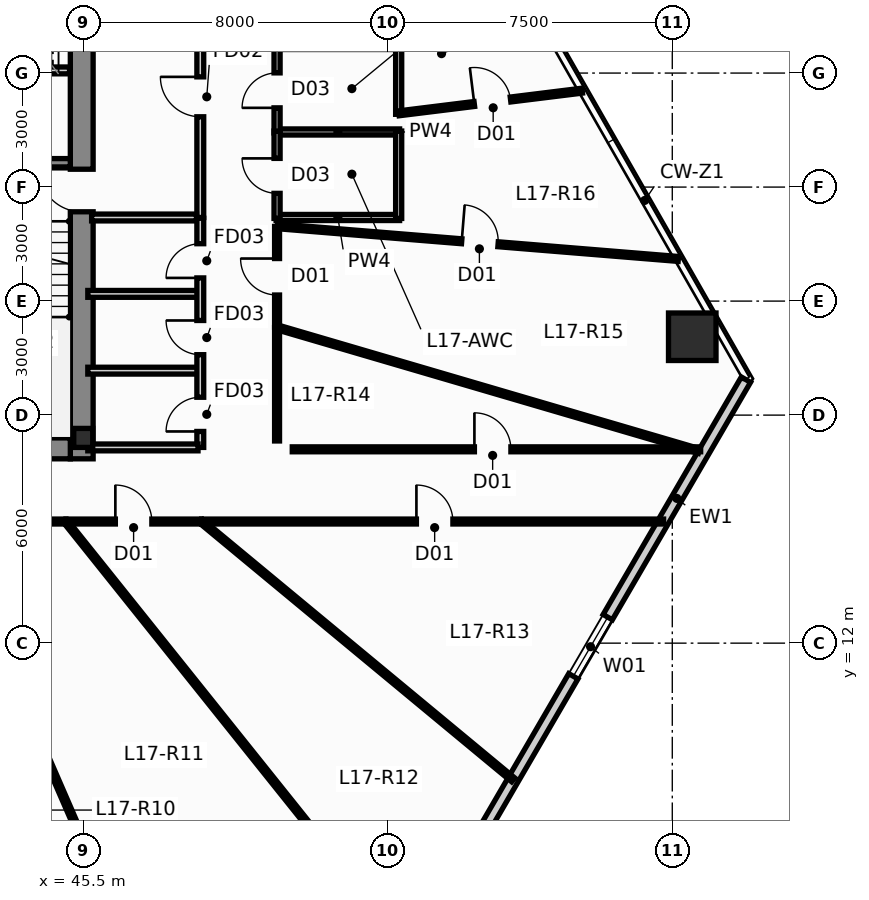
"""IFC4 building model, lengths in metres.
Left out: names, types, materials, properties, quantities, classifications, styles, units other than length and angle.
Written with IfcOpenShell. Run it as: python <this file> out.ifc"""

import sys

from ifc_helpers import new_model, si_unit, direction, frame, frame_2d, origin, origin_2d, place, context, subcontext, project, spatial, rectangle, hollow_rectangle, i_section, extrude, source, transform, mapped, element, fill, save


model = new_model("IFC4")
c1 = context("Model", 3, precision=1e-05, world=origin(), true_north=direction((0.0, 1.0)))
c2 = subcontext(c1, "Body", "Model", "MODEL_VIEW")
j1 = project(units=[si_unit("LENGTHUNIT", "METRE"), si_unit("PLANEANGLEUNIT", "RADIAN")], contexts=[c1])
p1 = place(None, origin())
s1 = spatial("IfcSite", under=j1, at=p1, CompositionType="ELEMENT")
p2 = place(p1, origin())
s2 = spatial("IfcBuilding", under=s1, at=p2, CompositionType="ELEMENT")
p3 = place(p2, frame((0.0, 0.0, 67.75)))
s3 = spatial("IfcBuildingStorey", under=s2, at=p3, CompositionType="ELEMENT", Elevation=67.75)
m1 = source(origin(), c2, "Body", "SweptSolid", [
    extrude(i_section(OverallWidth=0.5, OverallDepth=0.5, WebThickness=0.028, FlangeThickness=0.04, at=origin_2d()), origin(), (0.0, 0.0, 1.0), 3.65),
])
p4 = place(p3, frame((45.5, 17.4, 0.0), z_axis=(0.0, 0.0, 1.0), x_axis=(1.0, 0.0, 0.0)))
e1 = element("IfcColumn", 1, at=p4, inside=s3, PredefinedType="COLUMN", context=c2, shape_type="MappedRepresentation", body=[
    mapped(m1, transform((0.0, 0.0, 0.0), scale=1.0)),
])
p5 = place(p3, frame((45.46, 16.85, 0.0), z_axis=(0.0, 0.0, 1.0), x_axis=(0.0, 1.0, 0.0)))
e2 = element("IfcWall", 2, at=p5, inside=s3, PredefinedType="SHEAR", context=c2, shape_type="SweptSolid", body=[
    extrude(rectangle(XDim=13.425, YDim=0.6, at=frame_2d((6.712, 0.0))), origin(), (0.0, 0.0, 1.0), 3.65),
])
p6 = place(p5, frame((6.5, 0.0, 0.0)))
e3 = element("IfcOpeningElement", 3, at=p6, cuts=e2, PredefinedType="OPENING", context=c2, shape_type="SweptSolid", body=[
    extrude(rectangle(XDim=1.12, YDim=2.15, at=frame_2d((0.56, 1.075))), frame((0.0, 0.312, 0.0), z_axis=(0.0, -1.0, 0.0), x_axis=(1.0, 0.0, 0.0)), (0.0, 0.0, 1.0), 0.624),
])
p7 = place(p5, frame((10.95, 0.0, 0.0)))
e4 = element("IfcOpeningElement", 4, at=p7, cuts=e2, PredefinedType="OPENING", context=c2, shape_type="SweptSolid", body=[
    extrude(rectangle(XDim=1.2, YDim=2.2, at=frame_2d((0.6, 1.1))), frame((0.0, 0.312, 0.0), z_axis=(0.0, -1.0, 0.0), x_axis=(1.0, 0.0, 0.0)), (0.0, 0.0, 1.0), 0.624),
])
p8 = place(p3, frame((42.26, 17.125, 0.0), z_axis=(0.0, 0.0, 1.0), x_axis=(1.0, 0.0, 0.0)))
e5 = element("IfcWall", 5, at=p8, inside=s3, PredefinedType="SHEAR", context=c2, shape_type="SweptSolid", body=[
    extrude(rectangle(XDim=2.9, YDim=0.55, at=frame_2d((1.45, 0.0))), origin(), (0.0, 0.0, 1.0), 3.65),
])
p9 = place(p3, frame((42.26, 24.64, 0.0), z_axis=(0.0, 0.0, 1.0), x_axis=(1.0, 0.0, 0.0)))
e6 = element("IfcWall", 6, at=p9, inside=s3, PredefinedType="SHEAR", context=c2, shape_type="SweptSolid", body=[
    extrude(rectangle(XDim=2.9, YDim=0.22, at=frame_2d((1.45, 0.0))), origin(), (0.0, 0.0, 1.0), 3.65),
])
m2 = source(origin(), c2, "Body", "SweptSolid", [
    extrude(hollow_rectangle(XDim=1.25, YDim=1.25, WallThickness=0.07, at=origin_2d()), origin(), (0.0, 0.0, 1.0), 3.651),
])
p10 = place(p3, frame((61.525, 20.062, 0.0), z_axis=(-0.010364932146, -0.021532310652, 0.999714423113), x_axis=(0.901042175273, -0.433731481886, 0.0)))
e7 = element("IfcColumn", 7, at=p10, inside=s3, PredefinedType="COLUMN", context=c2, shape_type="MappedRepresentation", body=[
    mapped(m2, transform((0.0, 0.0, 0.0), scale=1.0)),
])
p11 = place(p3, frame((62.938, 18.933, 0.0), z_axis=(0.0, 0.0, 1.0), x_axis=(-0.502946407574, -0.864317598518, 0.0)))
e8 = element("IfcWall", 8, at=p11, inside=s3, PredefinedType="STANDARD", context=c2, shape_type="SweptSolid", body=[
    extrude(rectangle(XDim=16.258, YDim=0.28, at=frame_2d((8.129, 0.0))), origin(), (0.0, 0.0, 1.0), 3.4),
])
p12 = place(p11, frame((7.23, 0.0, 0.9)))
e9 = element("IfcOpeningElement", 9, at=p12, cuts=e8, PredefinedType="OPENING", context=c2, shape_type="SweptSolid", body=[
    extrude(rectangle(XDim=1.8, YDim=1.8, at=frame_2d((0.9, 0.9))), frame((0.0, 0.152, 0.0), z_axis=(0.0, -1.0, 0.0), x_axis=(1.0, 0.0, 0.0)), (0.0, 0.0, 1.0), 0.304),
])
p13 = place(p3, frame((48.58, 23.2, 0.0), z_axis=(0.0, 0.0, 1.0), x_axis=(0.0, 1.0, 0.0)))
e10 = element("IfcWall", 10, at=p13, inside=s3, PredefinedType="PARTITIONING", context=c2, shape_type="SweptSolid", body=[
    extrude(rectangle(XDim=6.4, YDim=0.18, at=frame_2d((3.2, 0.0))), origin(), (0.0, 0.0, 1.0), 3.026),
])
p14 = place(p13, frame((2.65, 0.0, 0.0)))
e11 = element("IfcOpeningElement", 11, at=p14, cuts=e10, PredefinedType="OPENING", context=c2, shape_type="SweptSolid", body=[
    extrude(rectangle(XDim=1.05, YDim=2.15, at=frame_2d((0.525, 1.075))), frame((0.0, 0.102, 0.0), z_axis=(0.0, -1.0, 0.0), x_axis=(1.0, 0.0, 0.0)), (0.0, 0.0, 1.0), 0.204),
])
p15 = place(p3, frame((45.72, 23.2, 0.0), z_axis=(0.0, 0.0, 1.0), x_axis=(1.0, 0.0, 0.0)))
e12 = element("IfcWall", 12, at=p15, inside=s3, PredefinedType="PARTITIONING", context=c2, shape_type="SweptSolid", body=[
    extrude(rectangle(XDim=2.76, YDim=0.18, at=frame_2d((1.38, 0.0))), origin(), (0.0, 0.0, 1.0), 3.4),
])
for number, where, z_axis, x_axis in (
    (13, (42.24, 27.07, 0.0), (0.0, 0.0, 1.0), (1.0, 0.0, 0.0)),
    (14, (45.62, 19.17, 0.0), (0.0, 0.0, 1.0), (1.0, 0.0, 0.0)),
    (15, (45.62, 21.19, 0.0), (0.0, 0.0, 1.0), (1.0, 0.0, 0.0)),
):
    element("IfcWall", number, at=place(p3, frame(where, z_axis=z_axis, x_axis=x_axis)), inside=s3, PredefinedType="PARTITIONING", context=c2, shape_type="SweptSolid", body=[
        extrude(rectangle(XDim=2.9, YDim=0.18, at=frame_2d((1.45, 0.0))), origin(), (0.0, 0.0, 1.0), 3.4),
    ])
p16 = place(p3, frame((48.58, 17.15, 0.0), z_axis=(0.0, 0.0, 1.0), x_axis=(0.0, 1.0, 0.0)))
e16 = element("IfcWall", 16, at=p16, inside=s3, PredefinedType="PARTITIONING", context=c2, shape_type="SweptSolid", body=[
    extrude(rectangle(XDim=6.03, YDim=0.18, at=frame_2d((3.015, 0.0))), origin(), (0.0, 0.0, 1.0), 3.4),
])
p17 = place(p16, frame((0.42, 0.0, 0.0)))
e17 = element("IfcOpeningElement", 17, at=p17, cuts=e16, PredefinedType="OPENING", context=c2, shape_type="SweptSolid", body=[
    extrude(rectangle(XDim=0.9, YDim=2.1, at=frame_2d((0.45, 1.05))), frame((0.0, 0.102, 0.0), z_axis=(0.0, -1.0, 0.0), x_axis=(1.0, 0.0, 0.0)), (0.0, 0.0, 1.0), 0.204),
])
p18 = place(p16, frame((2.44, 0.0, 0.0)))
e18 = element("IfcOpeningElement", 18, at=p18, cuts=e16, PredefinedType="OPENING", context=c2, shape_type="SweptSolid", body=[
    extrude(rectangle(XDim=0.9, YDim=2.1, at=frame_2d((0.45, 1.05))), frame((0.0, 0.102, 0.0), z_axis=(0.0, -1.0, 0.0), x_axis=(1.0, 0.0, 0.0)), (0.0, 0.0, 1.0), 0.204),
])
p19 = place(p16, frame((4.46, 0.0, 0.0)))
e19 = element("IfcOpeningElement", 19, at=p19, cuts=e16, PredefinedType="OPENING", context=c2, shape_type="SweptSolid", body=[
    extrude(rectangle(XDim=0.9, YDim=2.1, at=frame_2d((0.45, 1.05))), frame((0.0, 0.102, 0.0), z_axis=(0.0, -1.0, 0.0), x_axis=(1.0, 0.0, 0.0)), (0.0, 0.0, 1.0), 0.204),
])
p20 = place(p3, frame((45.62, 17.15, 0.0), z_axis=(0.0, 0.0, 1.0), x_axis=(1.0, 0.0, 0.0)))
e20 = element("IfcWall", 20, at=p20, inside=s3, PredefinedType="PARTITIONING", context=c2, shape_type="SweptSolid", body=[
    extrude(rectangle(XDim=2.9, YDim=0.18, at=frame_2d((1.45, 0.0))), origin(), (0.0, 0.0, 1.0), 2.783),
])
for number, where, z_axis, x_axis in (
    (21, (50.575, 23.2, 0.0), (0.0, 0.0, 1.0), (1.0, 0.0, 0.0)),
    (22, (50.575, 25.45, 0.0), (0.0, 0.0, 1.0), (1.0, 0.0, 0.0)),
):
    element("IfcWall", number, at=place(p3, frame(where, z_axis=z_axis, x_axis=x_axis)), inside=s3, PredefinedType="PLUMBINGWALL", context=c2, shape_type="SweptSolid", body=[
        extrude(rectangle(XDim=3.25, YDim=0.16, at=frame_2d((1.625, 0.0))), origin(), (0.0, 0.0, 1.0), 3.4),
    ])
p21 = place(p3, frame((50.6, 25.425, 0.0), z_axis=(0.0, 0.0, 1.0), x_axis=(0.0, 1.0, 0.0)))
e23 = element("IfcWall", 23, at=p21, inside=s3, PredefinedType="PLUMBINGWALL", context=c2, shape_type="SweptSolid", body=[
    extrude(rectangle(XDim=2.3, YDim=0.16, at=frame_2d((1.15, 0.0))), origin(), (0.0, 0.0, 1.0), 3.026),
])
p22 = place(p21, frame((0.66, 0.0, 0.0)))
e24 = element("IfcOpeningElement", 24, at=p22, cuts=e23, PredefinedType="OPENING", context=c2, shape_type="SweptSolid", body=[
    extrude(rectangle(XDim=0.92, YDim=2.1, at=frame_2d((0.46, 1.05))), frame((0.0, 0.092, 0.0), z_axis=(0.0, -1.0, 0.0), x_axis=(1.0, 0.0, 0.0)), (0.0, 0.0, 1.0), 0.184),
])
p23 = place(p3, frame((50.6, 23.175, 0.0), z_axis=(0.0, 0.0, 1.0), x_axis=(0.0, 1.0, 0.0)))
e25 = element("IfcWall", 25, at=p23, inside=s3, PredefinedType="PLUMBINGWALL", context=c2, shape_type="SweptSolid", body=[
    extrude(rectangle(XDim=2.3, YDim=0.16, at=frame_2d((1.15, 0.0))), origin(), (0.0, 0.0, 1.0), 3.026),
])
p24 = place(p23, frame((0.66, 0.0, 0.0)))
e26 = element("IfcOpeningElement", 26, at=p24, cuts=e25, PredefinedType="OPENING", context=c2, shape_type="SweptSolid", body=[
    extrude(rectangle(XDim=0.92, YDim=2.1, at=frame_2d((0.46, 1.05))), frame((0.0, 0.092, 0.0), z_axis=(0.0, -1.0, 0.0), x_axis=(1.0, 0.0, 0.0)), (0.0, 0.0, 1.0), 0.184),
])
p25 = place(p3, frame((53.8, 23.175, 0.0), z_axis=(0.0, 0.0, 1.0), x_axis=(0.0, 1.0, 0.0)))
e27 = element("IfcWall", 27, at=p25, inside=s3, PredefinedType="PLUMBINGWALL", context=c2, shape_type="SweptSolid", body=[
    extrude(rectangle(XDim=2.3, YDim=0.16, at=frame_2d((1.15, 0.0))), origin(), (0.0, 0.0, 1.0), 3.026),
])
p26 = place(p3, frame((53.8, 25.915, 0.0), z_axis=(0.0, 0.0, 1.0), x_axis=(0.0, 1.0, 0.0)))
e28 = element("IfcWall", 28, at=p26, inside=s3, PredefinedType="PLUMBINGWALL", context=c2, shape_type="SweptSolid", body=[
    extrude(rectangle(XDim=1.81, YDim=0.16, at=frame_2d((0.905, 0.0))), origin(), (0.0, 0.0, 1.0), 3.026),
])
p27 = place(p3, frame((45.043, 15.196, 0.0), z_axis=(0.0, 0.0, 1.0), x_axis=(0.62480053494, -0.780784407848, 0.0)))
e29 = element("IfcWall", 29, at=p27, inside=s3, PredefinedType="PARTITIONING", context=c2, shape_type="SweptSolid", body=[
    extrude(rectangle(XDim=13.265, YDim=0.13, at=frame_2d((6.632, 0.0))), origin(), (0.0, 0.0, 1.0), 2.783),
])
p28 = place(p3, frame((48.615, 15.2, 0.0), z_axis=(0.0, 0.0, 1.0), x_axis=(1.0, 0.0, 0.0)))
e30 = element("IfcWall", 30, at=p28, inside=s3, PredefinedType="PARTITIONING", context=c2, shape_type="SweptSolid", body=[
    extrude(rectangle(XDim=12.156, YDim=0.13, at=frame_2d((6.078, 0.0))), origin(), (0.0, 0.0, 1.0), 3.4),
])
p29 = place(p28, frame((5.652, 0.0, 0.0)))
e31 = element("IfcOpeningElement", 31, at=p29, cuts=e30, PredefinedType="OPENING", context=c2, shape_type="SweptSolid", body=[
    extrude(rectangle(XDim=0.96, YDim=2.15, at=frame_2d((0.48, 1.075))), frame((0.0, 0.077, 0.0), z_axis=(0.0, -1.0, 0.0), x_axis=(1.0, 0.0, 0.0)), (0.0, 0.0, 1.0), 0.154),
])
p30 = place(p3, frame((41.832, 15.195, 0.0), z_axis=(0.0, 0.0, 1.0), x_axis=(0.398769355863, -0.917051253107, 0.0)))
e32 = element("IfcWall", 32, at=p30, inside=s3, PredefinedType="PARTITIONING", context=c2, shape_type="SweptSolid", body=[
    extrude(rectangle(XDim=11.354, YDim=0.13, at=frame_2d((5.677, 0.0))), origin(), (0.0, 0.0, 1.0), 3.4),
])
p31 = place(p3, frame((50.605, 20.309, 0.0), z_axis=(0.0, 0.0, 1.0), x_axis=(0.959589046709, -0.281405155311, 0.0)))
e33 = element("IfcWall", 33, at=p31, inside=s3, PredefinedType="PARTITIONING", context=c2, shape_type="SweptSolid", body=[
    extrude(rectangle(XDim=11.567, YDim=0.13, at=frame_2d((5.783, 0.0))), origin(), (0.0, 0.0, 1.0), 3.4),
])
p32 = place(p3, frame((48.614, 15.197, 0.0), z_axis=(0.0, 0.0, 1.0), x_axis=(0.770033143694, -0.638003885265, 0.0)))
e34 = element("IfcWall", 34, at=p32, inside=s3, PredefinedType="PARTITIONING", context=c2, shape_type="SweptSolid", body=[
    extrude(rectangle(XDim=10.651, YDim=0.13, at=frame_2d((5.326, 0.0))), origin(), (0.0, 0.0, 1.0), 3.4),
])
p33 = place(p3, frame((50.605, 22.97, 0.0), z_axis=(0.0, 0.0, 1.0), x_axis=(0.996688315878, -0.081316671064, 0.0)))
e35 = element("IfcWall", 35, at=p33, inside=s3, PredefinedType="PARTITIONING", context=c2, shape_type="SweptSolid", body=[
    extrude(rectangle(XDim=10.589, YDim=0.13, at=frame_2d((5.295, 0.0))), origin(), (0.0, 0.0, 1.0), 3.4),
])
p34 = place(p33, frame((4.87, 0.0, 0.0)))
e36 = element("IfcOpeningElement", 36, at=p34, cuts=e35, PredefinedType="OPENING", context=c2, shape_type="SweptSolid", body=[
    extrude(rectangle(XDim=0.96, YDim=2.15, at=frame_2d((0.48, 1.075))), frame((0.0, 0.077, 0.0), z_axis=(0.0, -1.0, 0.0), x_axis=(1.0, 0.0, 0.0)), (0.0, 0.0, 1.0), 0.154),
])
p35 = place(p3, frame((51.0, 17.1, 0.0), z_axis=(0.0, 0.0, 1.0), x_axis=(1.0, 0.0, 0.0)))
e37 = element("IfcWall", 37, at=p35, inside=s3, PredefinedType="PARTITIONING", context=c2, shape_type="SweptSolid", body=[
    extrude(rectangle(XDim=10.746, YDim=0.13, at=frame_2d((5.373, 0.0))), origin(), (0.0, 0.0, 1.0), 3.4),
])
p36 = place(p35, frame((4.793, 0.0, 0.0)))
e38 = element("IfcOpeningElement", 38, at=p36, cuts=e37, PredefinedType="OPENING", context=c2, shape_type="SweptSolid", body=[
    extrude(rectangle(XDim=0.96, YDim=2.15, at=frame_2d((0.48, 1.075))), frame((0.0, 0.077, 0.0), z_axis=(0.0, -1.0, 0.0), x_axis=(1.0, 0.0, 0.0)), (0.0, 0.0, 1.0), 0.154),
])
p37 = place(p3, frame((53.805, 25.941, 0.0), z_axis=(0.0, 0.0, 1.0), x_axis=(0.992440032107, 0.122730528688, 0.0)))
e39 = element("IfcWall", 39, at=p37, inside=s3, PredefinedType="PARTITIONING", context=c2, shape_type="SweptSolid", body=[
    extrude(rectangle(XDim=4.862, YDim=0.13, at=frame_2d((2.431, 0.0))), origin(), (0.0, 0.0, 1.0), 3.4),
])
p38 = place(p37, frame((2.001, 0.0, 0.0)))
e40 = element("IfcOpeningElement", 40, at=p38, cuts=e39, PredefinedType="OPENING", context=c2, shape_type="SweptSolid", body=[
    extrude(rectangle(XDim=0.96, YDim=2.15, at=frame_2d((0.48, 1.075))), frame((0.0, 0.077, 0.0), z_axis=(0.0, -1.0, 0.0), x_axis=(1.0, 0.0, 0.0)), (0.0, 0.0, 1.0), 0.154),
])
p39 = place(p3, frame((45.045, 15.2, 0.0), z_axis=(0.0, 0.0, 1.0), x_axis=(1.0, 0.0, 0.0)))
e41 = element("IfcWall", 41, at=p39, inside=s3, PredefinedType="PARTITIONING", context=c2, shape_type="SweptSolid", body=[
    extrude(rectangle(XDim=3.56, YDim=0.13, at=frame_2d((1.78, 0.0))), origin(), (0.0, 0.0, 1.0), 3.4),
])
p40 = place(p39, frame((1.3, 0.0, 0.0)))
e42 = element("IfcOpeningElement", 42, at=p40, cuts=e41, PredefinedType="OPENING", context=c2, shape_type="SweptSolid", body=[
    extrude(rectangle(XDim=0.96, YDim=2.15, at=frame_2d((0.48, 1.075))), frame((0.0, 0.077, 0.0), z_axis=(0.0, -1.0, 0.0), x_axis=(1.0, 0.0, 0.0)), (0.0, 0.0, 1.0), 0.154),
])
p41 = place(p3, frame((41.835, 15.2, 0.0), z_axis=(0.0, 0.0, 1.0), x_axis=(1.0, 0.0, 0.0)))
e43 = element("IfcWall", 43, at=p41, inside=s3, PredefinedType="PARTITIONING", context=c2, shape_type="SweptSolid", body=[
    extrude(rectangle(XDim=3.2, YDim=0.13, at=frame_2d((1.6, 0.0))), origin(), (0.0, 0.0, 1.0), 3.026),
])
p42 = place(p41, frame((1.12, 0.0, 0.0)))
e44 = element("IfcOpeningElement", 44, at=p42, cuts=e43, PredefinedType="OPENING", context=c2, shape_type="SweptSolid", body=[
    extrude(rectangle(XDim=0.96, YDim=2.15, at=frame_2d((0.48, 1.075))), frame((0.0, 0.077, 0.0), z_axis=(0.0, -1.0, 0.0), x_axis=(1.0, 0.0, 0.0)), (0.0, 0.0, 1.0), 0.154),
])
p43 = place(p3, frame((50.6, 17.32, 0.0), z_axis=(0.0, 0.0, 1.0), x_axis=(0.0, 1.0, 0.0)))
e45 = element("IfcWall", 45, at=p43, inside=s3, PredefinedType="PARTITIONING", context=c2, shape_type="SweptSolid", body=[
    extrude(rectangle(XDim=2.985, YDim=0.13, at=frame_2d((1.492, 0.0))), origin(), (0.0, 0.0, 1.0), 3.4),
])
p44 = place(p3, frame((50.6, 20.315, 0.0), z_axis=(0.0, 0.0, 1.0), x_axis=(0.0, 1.0, 0.0)))
e46 = element("IfcWall", 46, at=p44, inside=s3, PredefinedType="PARTITIONING", context=c2, shape_type="SweptSolid", body=[
    extrude(rectangle(XDim=2.65, YDim=0.13, at=frame_2d((1.325, 0.0))), origin(), (0.0, 0.0, 1.0), 3.4),
])
p45 = place(p44, frame((0.845, 0.0, 0.0)))
e47 = element("IfcOpeningElement", 47, at=p45, cuts=e46, PredefinedType="OPENING", context=c2, shape_type="SweptSolid", body=[
    extrude(rectangle(XDim=0.96, YDim=2.15, at=frame_2d((0.48, 1.075))), frame((0.0, 0.077, 0.0), z_axis=(0.0, -1.0, 0.0), x_axis=(1.0, 0.0, 0.0)), (0.0, 0.0, 1.0), 0.154),
])
p46 = place(p12, origin())
e48 = element("IfcWindow", 48, at=p46, inside=s3, PartitioningType="SINGLE_PANEL", PredefinedType="WINDOW", context=c2, shape_type="SweptSolid", body=[
    extrude(rectangle(XDim=1.8, YDim=1.8, at=frame_2d((0.9, 0.9))), frame((0.0, 0.03, 0.0), z_axis=(0.0, -1.0, 0.0), x_axis=(1.0, 0.0, 0.0)), (0.0, 0.0, 1.0), 0.06),
])
fill(e9, e48)
p47 = place(p6, origin())
e49 = element("IfcDoor", 49, at=p47, inside=s3, OperationType="SINGLE_SWING_RIGHT", PredefinedType="DOOR", context=c2, shape_type="SweptSolid", body=[
    extrude(rectangle(XDim=1.12, YDim=2.15, at=frame_2d((0.56, 1.075))), frame((0.0, 0.025, 0.0), z_axis=(0.0, -1.0, 0.0), x_axis=(1.0, 0.0, 0.0)), (0.0, 0.0, 1.0), 0.05),
])
fill(e3, e49)
p48 = place(p14, origin())
e50 = element("IfcDoor", 50, at=p48, inside=s3, OperationType="SINGLE_SWING_RIGHT", PredefinedType="DOOR", context=c2, shape_type="SweptSolid", body=[
    extrude(rectangle(XDim=1.05, YDim=2.15, at=frame_2d((0.525, 1.075))), frame((0.0, 0.025, 0.0), z_axis=(0.0, -1.0, 0.0), x_axis=(1.0, 0.0, 0.0)), (0.0, 0.0, 1.0), 0.05),
])
fill(e11, e50)
p49 = place(p17, origin())
e51 = element("IfcDoor", 51, at=p49, inside=s3, OperationType="SINGLE_SWING_LEFT", PredefinedType="DOOR", context=c2, shape_type="SweptSolid", body=[
    extrude(rectangle(XDim=0.9, YDim=2.1, at=frame_2d((0.45, 1.05))), frame((0.0, 0.025, 0.0), z_axis=(0.0, -1.0, 0.0), x_axis=(1.0, 0.0, 0.0)), (0.0, 0.0, 1.0), 0.05),
])
fill(e17, e51)
p50 = place(p18, origin())
e52 = element("IfcDoor", 52, at=p50, inside=s3, OperationType="SINGLE_SWING_RIGHT", PredefinedType="DOOR", context=c2, shape_type="SweptSolid", body=[
    extrude(rectangle(XDim=0.9, YDim=2.1, at=frame_2d((0.45, 1.05))), frame((0.0, 0.025, 0.0), z_axis=(0.0, -1.0, 0.0), x_axis=(1.0, 0.0, 0.0)), (0.0, 0.0, 1.0), 0.05),
])
fill(e18, e52)
p51 = place(p19, origin())
e53 = element("IfcDoor", 53, at=p51, inside=s3, OperationType="SINGLE_SWING_LEFT", PredefinedType="DOOR", context=c2, shape_type="SweptSolid", body=[
    extrude(rectangle(XDim=0.9, YDim=2.1, at=frame_2d((0.45, 1.05))), frame((0.0, 0.025, 0.0), z_axis=(0.0, -1.0, 0.0), x_axis=(1.0, 0.0, 0.0)), (0.0, 0.0, 1.0), 0.05),
])
fill(e19, e53)
p52 = place(p22, origin())
e54 = element("IfcDoor", 54, at=p52, inside=s3, OperationType="SINGLE_SWING_LEFT", PredefinedType="DOOR", context=c2, shape_type="SweptSolid", body=[
    extrude(rectangle(XDim=0.92, YDim=2.1, at=frame_2d((0.46, 1.05))), frame((0.0, 0.025, 0.0), z_axis=(0.0, -1.0, 0.0), x_axis=(1.0, 0.0, 0.0)), (0.0, 0.0, 1.0), 0.05),
])
fill(e24, e54)
p53 = place(p24, origin())
e55 = element("IfcDoor", 55, at=p53, inside=s3, OperationType="SINGLE_SWING_RIGHT", PredefinedType="DOOR", context=c2, shape_type="SweptSolid", body=[
    extrude(rectangle(XDim=0.92, YDim=2.1, at=frame_2d((0.46, 1.05))), frame((0.0, 0.025, 0.0), z_axis=(0.0, -1.0, 0.0), x_axis=(1.0, 0.0, 0.0)), (0.0, 0.0, 1.0), 0.05),
])
fill(e26, e55)
p54 = place(p29, origin())
e56 = element("IfcDoor", 56, at=p54, inside=s3, OperationType="SINGLE_SWING_LEFT", PredefinedType="DOOR", context=c2, shape_type="SweptSolid", body=[
    extrude(rectangle(XDim=0.96, YDim=2.15, at=frame_2d((0.48, 1.075))), frame((0.0, 0.025, 0.0), z_axis=(0.0, -1.0, 0.0), x_axis=(1.0, 0.0, 0.0)), (0.0, 0.0, 1.0), 0.05),
])
fill(e31, e56)
p55 = place(p34, origin())
e57 = element("IfcDoor", 57, at=p55, inside=s3, OperationType="SINGLE_SWING_LEFT", PredefinedType="DOOR", context=c2, shape_type="SweptSolid", body=[
    extrude(rectangle(XDim=0.96, YDim=2.15, at=frame_2d((0.48, 1.075))), frame((0.0, 0.025, 0.0), z_axis=(0.0, -1.0, 0.0), x_axis=(1.0, 0.0, 0.0)), (0.0, 0.0, 1.0), 0.05),
])
fill(e36, e57)
p56 = place(p36, origin())
e58 = element("IfcDoor", 58, at=p56, inside=s3, OperationType="SINGLE_SWING_LEFT", PredefinedType="DOOR", context=c2, shape_type="SweptSolid", body=[
    extrude(rectangle(XDim=0.96, YDim=2.15, at=frame_2d((0.48, 1.075))), frame((0.0, 0.025, 0.0), z_axis=(0.0, -1.0, 0.0), x_axis=(1.0, 0.0, 0.0)), (0.0, 0.0, 1.0), 0.05),
])
fill(e38, e58)
p57 = place(p38, origin())
e59 = element("IfcDoor", 59, at=p57, inside=s3, OperationType="SINGLE_SWING_LEFT", PredefinedType="DOOR", context=c2, shape_type="SweptSolid", body=[
    extrude(rectangle(XDim=0.96, YDim=2.15, at=frame_2d((0.48, 1.075))), frame((0.0, 0.025, 0.0), z_axis=(0.0, -1.0, 0.0), x_axis=(1.0, 0.0, 0.0)), (0.0, 0.0, 1.0), 0.05),
])
fill(e40, e59)
p58 = place(p40, origin())
e60 = element("IfcDoor", 60, at=p58, inside=s3, OperationType="SINGLE_SWING_LEFT", PredefinedType="DOOR", context=c2, shape_type="SweptSolid", body=[
    extrude(rectangle(XDim=0.96, YDim=2.15, at=frame_2d((0.48, 1.075))), frame((0.0, 0.025, 0.0), z_axis=(0.0, -1.0, 0.0), x_axis=(1.0, 0.0, 0.0)), (0.0, 0.0, 1.0), 0.05),
])
fill(e42, e60)
p59 = place(p45, origin())
e61 = element("IfcDoor", 61, at=p59, inside=s3, OperationType="SINGLE_SWING_RIGHT", PredefinedType="DOOR", context=c2, shape_type="SweptSolid", body=[
    extrude(rectangle(XDim=0.96, YDim=2.15, at=frame_2d((0.48, 1.075))), frame((0.0, 0.025, 0.0), z_axis=(0.0, -1.0, 0.0), x_axis=(1.0, 0.0, 0.0)), (0.0, 0.0, 1.0), 0.05),
])
fill(e47, e61)
save(model, sys.argv[1])
